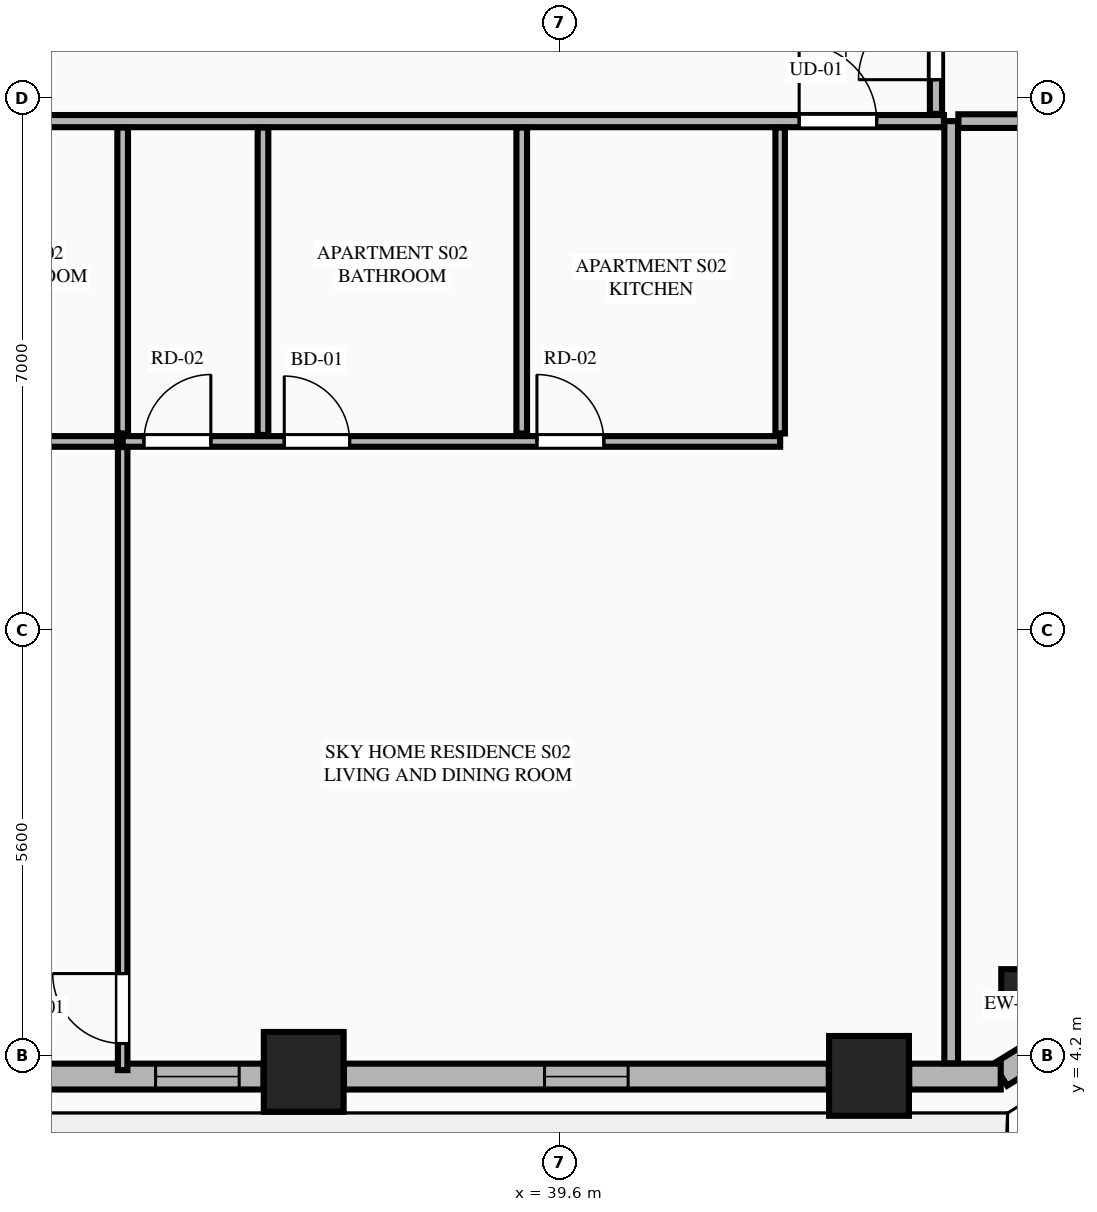
"""IFC4 building model, lengths in metres.
Left out: names, types, materials, properties, quantities, classifications, styles, units other than length and angle.
Written with IfcOpenShell. Run it as: python <this file> out.ifc"""

import sys

from ifc_helpers import new_model, si_unit, direction, frame, frame_2d, origin, origin_2d, place, context, subcontext, project, spatial, rectangle, extrude, element, fill, save


model = new_model("IFC4")
c1 = context("Model", 3, precision=1e-05, world=origin(), true_north=direction((0.0, 1.0)))
c2 = subcontext(c1, "Body", "Model", "MODEL_VIEW")
j1 = project(units=[si_unit("LENGTHUNIT", "METRE"), si_unit("PLANEANGLEUNIT", "RADIAN")], contexts=[c1])
p1 = place(None, origin())
s1 = spatial("IfcSite", under=j1, at=p1, CompositionType="ELEMENT")
p2 = place(p1, origin())
s2 = spatial("IfcBuilding", under=s1, at=p2, CompositionType="ELEMENT")
p3 = place(p2, frame((0.0, 0.0, 112.6)))
s3 = spatial("IfcBuildingStorey", under=s2, at=p3, CompositionType="ELEMENT", Elevation=112.6)
for number, where, z_axis, x_axis in (
    (1, (36.232, 3.992, 0.0), (0.0, 0.0, 1.0), (1.0, 0.0, 0.0)),
    (2, (43.669, 3.939, 0.0), (0.0, 0.0, 1.0), (1.0, 0.0, 0.0)),
):
    element("IfcColumn", number, at=place(p3, frame(where, z_axis=z_axis, x_axis=x_axis)), inside=s3, PredefinedType="COLUMN", context=c2, shape_type="SweptSolid", body=[
        extrude(rectangle(XDim=1.05, YDim=1.05, at=origin_2d()), origin(), (0.0, 0.0, 1.0), 3.55),
    ])
p4 = place(p3, frame((45.659, 5.093, 0.0), z_axis=(0.0, 0.0, 1.0), x_axis=(0.865160173452, 0.501495637342, 0.0)))
e3 = element("IfcColumn", 3, at=p4, inside=s3, PredefinedType="PILASTER", context=c2, shape_type="SweptSolid", body=[
    extrude(rectangle(XDim=0.5, YDim=0.35, at=origin_2d()), origin(), (0.0, 0.0, 1.0), 3.55),
])
p5 = place(p3, frame((45.397, 3.955, 0.0), z_axis=(0.0, 0.0, 1.0), x_axis=(0.851798915137, 0.523868884523, 0.0)))
e4 = element("IfcWall", 4, at=p5, inside=s3, PredefinedType="STANDARD", context=c2, shape_type="SweptSolid", body=[
    extrude(rectangle(XDim=1.848, YDim=0.34, at=frame_2d((0.924, 0.0))), origin(), (0.0, 0.0, 1.0), 3.34),
])
p6 = place(p3, frame((29.097, 3.93, 0.0), z_axis=(0.0, 0.0, 1.0), x_axis=(1.0, 0.0, 0.0)))
e5 = element("IfcWall", 5, at=p6, inside=s3, PredefinedType="STANDARD", context=c2, shape_type="SweptSolid", body=[
    extrude(rectangle(XDim=6.606, YDim=0.34, at=frame_2d((3.303, 0.0))), origin(), (0.0, 0.0, 1.0), 2.797),
])
p7 = place(p6, frame((1.775, 0.0, 0.0)))
e6 = element("IfcOpeningElement", 6, at=p7, cuts=e5, PredefinedType="OPENING", context=c2, shape_type="SweptSolid", body=[
    extrude(rectangle(XDim=1.1, YDim=2.25, at=frame_2d((0.55, 1.125))), frame((0.0, 0.18, 0.0), z_axis=(0.0, -1.0, 0.0), x_axis=(1.0, 0.0, 0.0)), (0.0, 0.0, 1.0), 0.36),
])
p8 = place(p6, frame((5.186, 0.0, 0.75)))
e7 = element("IfcOpeningElement", 7, at=p8, cuts=e5, PredefinedType="OPENING", context=c2, shape_type="SweptSolid", body=[
    extrude(rectangle(XDim=1.1, YDim=1.897, at=frame_2d((0.55, 0.948))), frame((0.0, 0.18, 0.0), z_axis=(0.0, -1.0, 0.0), x_axis=(1.0, 0.0, 0.0)), (0.0, 0.0, 1.0), 0.36),
])
p9 = place(p3, frame((36.761, 3.93, 0.0), z_axis=(0.0, 0.0, 1.0), x_axis=(1.0, 0.0, 0.0)))
e8 = element("IfcWall", 8, at=p9, inside=s3, PredefinedType="STANDARD", context=c2, shape_type="SweptSolid", body=[
    extrude(rectangle(XDim=6.379, YDim=0.34, at=frame_2d((3.189, 0.0))), origin(), (0.0, 0.0, 1.0), 2.797),
])
p10 = place(p9, frame((2.639, 0.0, 0.75)))
e9 = element("IfcOpeningElement", 9, at=p10, cuts=e8, PredefinedType="OPENING", context=c2, shape_type="SweptSolid", body=[
    extrude(rectangle(XDim=1.1, YDim=1.897, at=frame_2d((0.55, 0.948))), frame((0.0, 0.18, 0.0), z_axis=(0.0, -1.0, 0.0), x_axis=(1.0, 0.0, 0.0)), (0.0, 0.0, 1.0), 0.36),
])
p11 = place(p3, frame((44.198, 3.93, 0.0), z_axis=(0.0, 0.0, 1.0), x_axis=(1.0, 0.0, 0.0)))
e10 = element("IfcWall", 10, at=p11, inside=s3, PredefinedType="STANDARD", context=c2, shape_type="SweptSolid", body=[
    extrude(rectangle(XDim=1.204, YDim=0.34, at=frame_2d((0.602, 0.0))), origin(), (0.0, 0.0, 1.0), 3.34),
])
p12 = place(p3, frame((44.75, 4.105, 0.0), z_axis=(0.0, 0.0, 1.0), x_axis=(0.0, 1.0, 0.0)))
e11 = element("IfcWall", 11, at=p12, inside=s3, PredefinedType="PARTITIONING", context=c2, shape_type="SweptSolid", body=[
    extrude(rectangle(XDim=12.395, YDim=0.18, at=frame_2d((6.198, 0.0))), origin(), (0.0, 0.0, 1.0), 3.34),
])
p13 = place(p3, frame((28.663, 16.5, 0.0), z_axis=(0.0, 0.0, 1.0), x_axis=(1.0, 0.0, 0.0)))
e12 = element("IfcWall", 12, at=p13, inside=s3, PredefinedType="PARTITIONING", context=c2, shape_type="SweptSolid", body=[
    extrude(rectangle(XDim=15.992, YDim=0.16, at=frame_2d((7.996, 0.0))), origin(), (0.0, 0.0, 1.0), 3.34),
])
p14 = place(p13, frame((14.087, 0.0, 0.0)))
e13 = element("IfcOpeningElement", 13, at=p14, cuts=e12, PredefinedType="OPENING", context=c2, shape_type="SweptSolid", body=[
    extrude(rectangle(XDim=1.02, YDim=2.25, at=frame_2d((0.51, 1.125))), frame((0.0, 0.09, 0.0), z_axis=(0.0, -1.0, 0.0), x_axis=(1.0, 0.0, 0.0)), (0.0, 0.0, 1.0), 0.18),
])
p15 = place(p3, frame((42.5, 12.391, 0.0), z_axis=(0.0, 0.0, 1.0), x_axis=(0.0, 1.0, 0.0)))
e14 = element("IfcWall", 14, at=p15, inside=s3, PredefinedType="PARTITIONING", context=c2, shape_type="SweptSolid", body=[
    extrude(rectangle(XDim=4.024, YDim=0.125, at=frame_2d((2.012, 0.0))), origin(), (0.0, 0.0, 1.0), 2.722),
])
p16 = place(p3, frame((33.85, 12.286, 0.0), z_axis=(0.0, 0.0, 1.0), x_axis=(1.0, 0.0, 0.0)))
e15 = element("IfcWall", 15, at=p16, inside=s3, PredefinedType="PLUMBINGWALL", context=c2, shape_type="SweptSolid", body=[
    extrude(rectangle(XDim=8.65, YDim=0.14, at=frame_2d((4.325, 0.0))), origin(), (0.0, 0.0, 1.0), 3.34),
])
p17 = place(p16, frame((0.28, 0.0, 0.0)))
e16 = element("IfcOpeningElement", 16, at=p17, cuts=e15, PredefinedType="OPENING", context=c2, shape_type="SweptSolid", body=[
    extrude(rectangle(XDim=0.88, YDim=2.15, at=frame_2d((0.44, 1.075))), frame((0.0, 0.08, 0.0), z_axis=(0.0, -1.0, 0.0), x_axis=(1.0, 0.0, 0.0)), (0.0, 0.0, 1.0), 0.16),
])
p18 = place(p16, frame((2.126, 0.0, 0.0)))
e17 = element("IfcOpeningElement", 17, at=p18, cuts=e15, PredefinedType="OPENING", context=c2, shape_type="SweptSolid", body=[
    extrude(rectangle(XDim=0.86, YDim=2.1, at=frame_2d((0.43, 1.05))), frame((0.0, 0.08, 0.0), z_axis=(0.0, -1.0, 0.0), x_axis=(1.0, 0.0, 0.0)), (0.0, 0.0, 1.0), 0.16),
])
p19 = place(p16, frame((5.45, 0.0, 0.0)))
e18 = element("IfcOpeningElement", 18, at=p19, cuts=e15, PredefinedType="OPENING", context=c2, shape_type="SweptSolid", body=[
    extrude(rectangle(XDim=0.88, YDim=2.15, at=frame_2d((0.44, 1.075))), frame((0.0, 0.08, 0.0), z_axis=(0.0, -1.0, 0.0), x_axis=(1.0, 0.0, 0.0)), (0.0, 0.0, 1.0), 0.16),
])
p20 = place(p3, frame((28.663, 12.286, 0.0), z_axis=(0.0, 0.0, 1.0), x_axis=(1.0, 0.0, 0.0)))
e19 = element("IfcWall", 19, at=p20, inside=s3, PredefinedType="PLUMBINGWALL", context=c2, shape_type="SweptSolid", body=[
    extrude(rectangle(XDim=5.112, YDim=0.14, at=frame_2d((2.556, 0.0))), origin(), (0.0, 0.0, 1.0), 3.34),
])
p21 = place(p20, frame((0.28, 0.0, 0.0)))
e20 = element("IfcOpeningElement", 20, at=p21, cuts=e19, PredefinedType="OPENING", context=c2, shape_type="SweptSolid", body=[
    extrude(rectangle(XDim=0.88, YDim=2.15, at=frame_2d((0.44, 1.075))), frame((0.0, 0.08, 0.0), z_axis=(0.0, -1.0, 0.0), x_axis=(1.0, 0.0, 0.0)), (0.0, 0.0, 1.0), 0.16),
])
p22 = place(p20, frame((1.988, 0.0, 0.0)))
e21 = element("IfcOpeningElement", 21, at=p22, cuts=e19, PredefinedType="OPENING", context=c2, shape_type="SweptSolid", body=[
    extrude(rectangle(XDim=0.86, YDim=2.1, at=frame_2d((0.43, 1.05))), frame((0.0, 0.08, 0.0), z_axis=(0.0, -1.0, 0.0), x_axis=(1.0, 0.0, 0.0)), (0.0, 0.0, 1.0), 0.16),
])
for number, where, z_axis, x_axis in (
    (22, (39.1, 12.391, 0.0), (0.0, 0.0, 1.0), (0.0, 1.0, 0.0)),
    (23, (33.85, 12.391, 0.0), (0.0, 0.0, 1.0), (0.0, 1.0, 0.0)),
):
    element("IfcWall", number, at=place(p3, frame(where, z_axis=z_axis, x_axis=x_axis)), inside=s3, PredefinedType="PLUMBINGWALL", context=c2, shape_type="SweptSolid", body=[
        extrude(rectangle(XDim=4.024, YDim=0.14, at=frame_2d((2.012, 0.0))), origin(), (0.0, 0.0, 1.0), 3.34),
    ])
p23 = place(p3, frame((33.85, 4.015, 0.0), z_axis=(0.0, 0.0, 1.0), x_axis=(0.0, 1.0, 0.0)))
e24 = element("IfcWall", 24, at=p23, inside=s3, PredefinedType="PARTITIONING", context=c2, shape_type="SweptSolid", body=[
    extrude(rectangle(XDim=8.196, YDim=0.125, at=frame_2d((4.098, 0.0))), origin(), (0.0, 0.0, 1.0), 3.34),
])
p24 = place(p23, frame((0.35, 0.0, 0.0)))
e25 = element("IfcOpeningElement", 25, at=p24, cuts=e24, PredefinedType="OPENING", context=c2, shape_type="SweptSolid", body=[
    extrude(rectangle(XDim=0.92, YDim=2.15, at=frame_2d((0.46, 1.075))), frame((0.0, 0.073, 0.0), z_axis=(0.0, -1.0, 0.0), x_axis=(1.0, 0.0, 0.0)), (0.0, 0.0, 1.0), 0.145),
])
p25 = place(p3, frame((35.696, 12.371, 0.0), z_axis=(0.0, 0.0, 1.0), x_axis=(0.0, 1.0, 0.0)))
e26 = element("IfcWall", 26, at=p25, inside=s3, PredefinedType="PLUMBINGWALL", context=c2, shape_type="SweptSolid", body=[
    extrude(rectangle(XDim=4.044, YDim=0.14, at=frame_2d((2.022, 0.0))), origin(), (0.0, 0.0, 1.0), 3.34),
])
p26 = place(p3, frame((44.845, 16.5, 0.0), z_axis=(0.0, 0.0, 1.0), x_axis=(1.0, 0.0, 0.0)))
e27 = element("IfcWall", 27, at=p26, inside=s3, PredefinedType="PARTITIONING", context=c2, shape_type="SweptSolid", body=[
    extrude(rectangle(XDim=7.77, YDim=0.18, at=frame_2d((3.885, 0.0))), origin(), (0.0, 0.0, 1.0), 3.34),
])
p27 = place(p3, frame((44.55, 16.595, 0.0), z_axis=(0.0, 0.0, 1.0), x_axis=(0.0, 1.0, 0.0)))
e28 = element("IfcWall", 28, at=p27, inside=s3, PredefinedType="PARTITIONING", context=c2, shape_type="SweptSolid", body=[
    extrude(rectangle(XDim=18.61, YDim=0.16, at=frame_2d((9.305, 0.0))), origin(), (0.0, 0.0, 1.0), 3.34),
])
p28 = place(p27, frame((0.45, 0.0, 0.0)))
e29 = element("IfcOpeningElement", 29, at=p28, cuts=e28, PredefinedType="OPENING", context=c2, shape_type="SweptSolid", body=[
    extrude(rectangle(XDim=1.02, YDim=2.25, at=frame_2d((0.51, 1.125))), frame((0.0, 0.09, 0.0), z_axis=(0.0, -1.0, 0.0), x_axis=(1.0, 0.0, 0.0)), (0.0, 0.0, 1.0), 0.18),
])
p29 = place(p10, origin())
e30 = element("IfcWindow", 30, at=p29, inside=s3, PartitioningType="SINGLE_PANEL", PredefinedType="WINDOW", context=c2, shape_type="SweptSolid", body=[
    extrude(rectangle(XDim=1.1, YDim=1.897, at=frame_2d((0.55, 0.948))), frame((0.0, 0.03, 0.0), z_axis=(0.0, -1.0, 0.0), x_axis=(1.0, 0.0, 0.0)), (0.0, 0.0, 1.0), 0.06),
])
fill(e9, e30)
p30 = place(p17, origin())
e31 = element("IfcDoor", 31, at=p30, inside=s3, OperationType="SINGLE_SWING_RIGHT", PredefinedType="DOOR", context=c2, shape_type="SweptSolid", body=[
    extrude(rectangle(XDim=0.88, YDim=2.15, at=frame_2d((0.44, 1.075))), frame((0.0, 0.025, 0.0), z_axis=(0.0, -1.0, 0.0), x_axis=(1.0, 0.0, 0.0)), (0.0, 0.0, 1.0), 0.05),
])
fill(e16, e31)
p31 = place(p18, origin())
e32 = element("IfcDoor", 32, at=p31, inside=s3, OperationType="SINGLE_SWING_LEFT", PredefinedType="DOOR", context=c2, shape_type="SweptSolid", body=[
    extrude(rectangle(XDim=0.86, YDim=2.1, at=frame_2d((0.43, 1.05))), frame((0.0, 0.025, 0.0), z_axis=(0.0, -1.0, 0.0), x_axis=(1.0, 0.0, 0.0)), (0.0, 0.0, 1.0), 0.05),
])
fill(e17, e32)
p32 = place(p14, origin())
e33 = element("IfcDoor", 33, at=p32, inside=s3, OperationType="SINGLE_SWING_LEFT", PredefinedType="DOOR", context=c2, shape_type="SweptSolid", body=[
    extrude(rectangle(XDim=1.02, YDim=2.25, at=frame_2d((0.51, 1.125))), frame((0.0, 0.025, 0.0), z_axis=(0.0, -1.0, 0.0), x_axis=(1.0, 0.0, 0.0)), (0.0, 0.0, 1.0), 0.05),
])
fill(e13, e33)
p33 = place(p19, origin())
e34 = element("IfcDoor", 34, at=p33, inside=s3, OperationType="SINGLE_SWING_LEFT", PredefinedType="DOOR", context=c2, shape_type="SweptSolid", body=[
    extrude(rectangle(XDim=0.88, YDim=2.15, at=frame_2d((0.44, 1.075))), frame((0.0, 0.025, 0.0), z_axis=(0.0, -1.0, 0.0), x_axis=(1.0, 0.0, 0.0)), (0.0, 0.0, 1.0), 0.05),
])
fill(e18, e34)
p34 = place(p24, origin())
e35 = element("IfcDoor", 35, at=p34, inside=s3, OperationType="SINGLE_SWING_RIGHT", PredefinedType="DOOR", context=c2, shape_type="SweptSolid", body=[
    extrude(rectangle(XDim=0.92, YDim=2.15, at=frame_2d((0.46, 1.075))), frame((0.0, 0.025, 0.0), z_axis=(0.0, -1.0, 0.0), x_axis=(1.0, 0.0, 0.0)), (0.0, 0.0, 1.0), 0.05),
])
fill(e25, e35)
p35 = place(p28, origin())
e36 = element("IfcDoor", 36, at=p35, inside=s3, OperationType="SINGLE_SWING_LEFT", PredefinedType="DOOR", context=c2, shape_type="SweptSolid", body=[
    extrude(rectangle(XDim=1.02, YDim=2.25, at=frame_2d((0.51, 1.125))), frame((0.0, 0.025, 0.0), z_axis=(0.0, -1.0, 0.0), x_axis=(1.0, 0.0, 0.0)), (0.0, 0.0, 1.0), 0.05),
])
fill(e29, e36)
p36 = place(p8, origin())
e37 = element("IfcWindow", 37, at=p36, inside=s3, PartitioningType="SINGLE_PANEL", PredefinedType="WINDOW", context=c2, shape_type="SweptSolid", body=[
    extrude(rectangle(XDim=1.1, YDim=1.897, at=frame_2d((0.55, 0.948))), frame((0.0, 0.03, 0.0), z_axis=(0.0, -1.0, 0.0), x_axis=(1.0, 0.0, 0.0)), (0.0, 0.0, 1.0), 0.06),
])
fill(e7, e37)
save(model, sys.argv[1])
